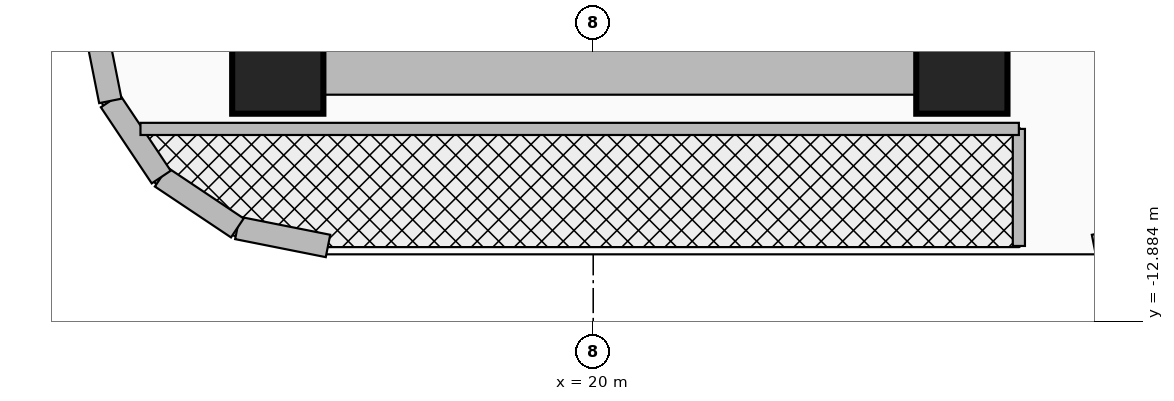
"""IFC4 building model, lengths in metres.
Left out: names, types, materials, properties, quantities, classifications, styles, units other than length and angle.
Written with IfcOpenShell. Run it as: python <this file> out.ifc"""

import sys

from ifc_helpers import new_model, si_unit, direction, frame, frame_2d, origin, origin_2d, place, context, subcontext, project, spatial, rectangle, extrude, source, transform, mapped, element, fill, save


model = new_model("IFC4")
c1 = context("Model", 3, precision=1e-05, world=origin(), true_north=direction((0.0, 1.0)))
c2 = subcontext(c1, "Body", "Model", "MODEL_VIEW")
j1 = project(units=[si_unit("LENGTHUNIT", "METRE"), si_unit("PLANEANGLEUNIT", "RADIAN")], contexts=[c1])
p1 = place(None, origin())
s1 = spatial("IfcSite", under=j1, at=p1, CompositionType="ELEMENT")
p2 = place(p1, origin())
s2 = spatial("IfcBuilding", under=s1, at=p2, CompositionType="ELEMENT")
p3 = place(p2, frame((0.0, 0.0, 109.4)))
s3 = spatial("IfcBuildingStorey", under=s2, at=p3, CompositionType="ELEMENT", Elevation=109.4)
p4 = place(p3, frame((24.85, -9.9, 0.0), z_axis=(0.0, 0.0, 1.0), x_axis=(0.0, 1.0, 0.0)))
e1 = element("IfcWall", 1, at=p4, inside=s3, PredefinedType="SHEAR", context=c2, shape_type="SweptSolid", body=[
    extrude(rectangle(XDim=8.95, YDim=0.7, at=frame_2d((4.475, 0.0))), origin(), (0.0, 0.0, 1.0), 3.46),
])
p5 = place(p3, frame((15.85, -9.55, 0.0), z_axis=(0.0, 0.0, 1.0), x_axis=(1.0, 0.0, 0.0)))
e2 = element("IfcWall", 2, at=p5, inside=s3, PredefinedType="SHEAR", context=c2, shape_type="SweptSolid", body=[
    extrude(rectangle(XDim=9.0, YDim=0.7, at=frame_2d((4.5, 0.0))), origin(), (0.0, 0.0, 1.0), 3.46),
])
m1 = source(origin(), c2, "Body", "SweptSolid", [
    extrude(rectangle(XDim=1.2, YDim=1.2, at=origin_2d()), origin(), (0.0, 0.0, 1.0), 3.7),
])
for number, where, z_axis, x_axis in (
    (3, (15.85, -9.55, 0.0), (0.0, 0.0, 1.0), (1.0, 0.0, 0.0)),
    (4, (24.85, -9.55, 0.0), (0.0, 0.0, 1.0), (1.0, 0.0, 0.0)),
):
    element("IfcColumn", number, at=place(p3, frame(where, z_axis=z_axis, x_axis=x_axis)), inside=s3, PredefinedType="COLUMN", context=c2, shape_type="MappedRepresentation", body=[
        mapped(m1, transform((0.0, 0.0, 0.0), x_axis=(1.0, 0.0, 0.0), y_axis=(0.0, 1.0, 0.0), z_axis=(0.0, 0.0, 1.0), scale=1.0)),
    ])
p6 = place(p3, frame((27.782, -11.653, 0.0), z_axis=(0.0, 0.0, 1.0), x_axis=(-0.980811661072, -0.194957650543, 0.0)))
e5 = element("IfcWall", 5, at=p6, inside=s3, PredefinedType="SOLIDWALL", context=c2, shape_type="SweptSolid", body=[
    extrude(rectangle(XDim=1.216, YDim=0.3, at=frame_2d((0.608, 0.0))), origin(), (0.0, 0.0, 1.0), 3.46),
])
p7 = place(p3, frame((16.511, -11.89, 0.0), z_axis=(0.0, 0.0, 1.0), x_axis=(-0.980804027463, 0.194996050505, 0.0)))
e6 = element("IfcWall", 6, at=p7, inside=s3, PredefinedType="SOLIDWALL", context=c2, shape_type="SweptSolid", body=[
    extrude(rectangle(XDim=1.216, YDim=0.3, at=frame_2d((0.608, 0.0))), origin(), (0.0, 0.0, 1.0), 3.46),
])
for number, where, z_axis, x_axis in (
    (7, (15.318, -11.653, 0.0), (0.0, 0.0, 1.0), (-0.831, 0.556, 0.0)),
    (8, (14.317, -10.983, 0.0), (0.0, 0.0, 1.0), (-0.556, 0.831, 0.0)),
):
    element("IfcWall", number, at=place(p3, frame(where, z_axis=z_axis, x_axis=x_axis)), inside=s3, PredefinedType="SOLIDWALL", context=c2, shape_type="SweptSolid", body=[
        extrude(rectangle(XDim=1.205, YDim=0.3, at=frame_2d((0.603, 0.0))), origin(), (0.0, 0.0, 1.0), 3.46),
    ])
p8 = place(p3, frame((13.647, -9.982, 0.0), z_axis=(0.0, 0.0, 1.0), x_axis=(-0.195189223115, 0.980765602568, 0.0)))
e9 = element("IfcWall", 9, at=p8, inside=s3, PredefinedType="SOLIDWALL", context=c2, shape_type="SweptSolid", body=[
    extrude(rectangle(XDim=1.216, YDim=0.3, at=frame_2d((0.608, 0.0))), origin(), (0.0, 0.0, 1.0), 3.46),
])
p9 = place(p3, frame((25.6, -11.89, 0.0), z_axis=(0.0, 0.0, 1.0), x_axis=(0.0, 1.0, 0.0)))
e10 = element("IfcWall", 10, at=p9, inside=s3, PredefinedType="PARTITIONING", context=c2, shape_type="SweptSolid", body=[
    extrude(rectangle(XDim=1.54, YDim=0.16, at=frame_2d((0.77, 0.0))), origin(), (0.0, 0.0, 1.0), 3.46),
])
p10 = place(p9, frame((0.32, 0.0, 0.0)))
e11 = element("IfcOpeningElement", 11, at=p10, cuts=e10, PredefinedType="OPENING", context=c2, shape_type="SweptSolid", body=[
    extrude(rectangle(XDim=0.9, YDim=2.1, at=frame_2d((0.45, 1.05))), frame((0.0, 0.095, 0.0), z_axis=(0.0, -1.0, 0.0), x_axis=(1.0, 0.0, 0.0)), (0.0, 0.0, 1.0), 0.19),
])
p11 = place(p3, frame((14.044, -10.35, 0.0), z_axis=(0.0, 0.0, 1.0), x_axis=(1.0, 0.0, 0.0)))
e12 = element("IfcWall", 12, at=p11, inside=s3, PredefinedType="PARTITIONING", context=c2, shape_type="SweptSolid", body=[
    extrude(rectangle(XDim=11.556, YDim=0.16, at=frame_2d((5.778, 0.0))), origin(), (0.0, 0.0, 1.0), 3.46),
])
p12 = place(p10, frame((0.9, 0.0, 0.0), z_axis=(0.0, 0.0, 1.0), x_axis=(-1.0, 0.0, 0.0)))
e13 = element("IfcDoor", 13, at=p12, inside=s3, OperationType="SINGLE_SWING_LEFT", PredefinedType="DOOR", context=c2, shape_type="SweptSolid", body=[
    extrude(rectangle(XDim=0.9, YDim=2.1, at=frame_2d((0.45, 1.05))), frame((0.0, 0.025, 0.0), z_axis=(0.0, -1.0, 0.0), x_axis=(1.0, 0.0, 0.0)), (0.0, 0.0, 1.0), 0.05),
])
fill(e11, e13)
save(model, sys.argv[1])
